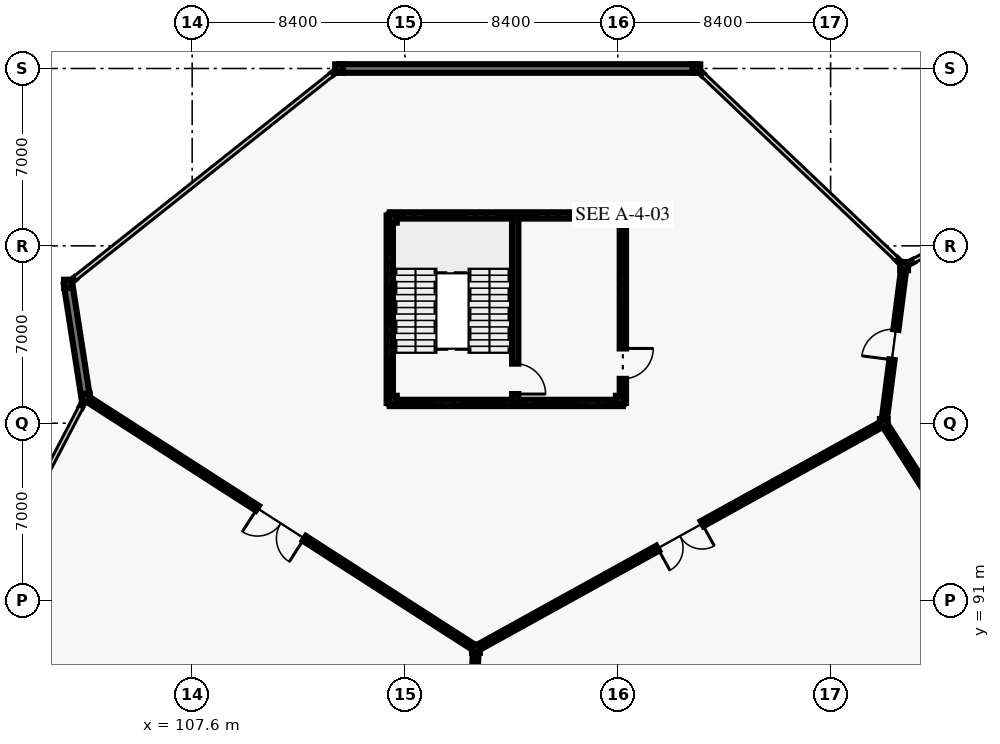
"""IFC4 building model, lengths in metres.
Left out: names, types, materials, properties, quantities, classifications, styles, units other than length and angle.
Written with IfcOpenShell. Run it as: python <this file> out.ifc"""

import sys

from ifc_helpers import new_model, si_unit, direction, frame, frame_2d, origin, origin_2d, place, context, subcontext, project, spatial, rectangle, i_section, extrude, element, fill, save


model = new_model("IFC4")
c1 = context("Model", 3, precision=1e-05, world=origin(), true_north=direction((0.0, 1.0)))
c2 = subcontext(c1, "Body", "Model", "MODEL_VIEW")
j1 = project(units=[si_unit("LENGTHUNIT", "METRE"), si_unit("PLANEANGLEUNIT", "RADIAN")], contexts=[c1])
p1 = place(None, origin())
s1 = spatial("IfcSite", under=j1, at=p1, CompositionType="ELEMENT")
p2 = place(p1, origin())
s2 = spatial("IfcBuilding", under=s1, at=p2, CompositionType="ELEMENT")
p3 = place(p2, frame((0.0, 0.0, 10.2)))
s3 = spatial("IfcBuildingStorey", under=s2, at=p3, CompositionType="ELEMENT", Elevation=10.2)
for number, where, z_axis, x_axis in (
    (1, (102.7, 103.5, 0.0), (0.0, 0.0, 1.0), (1.0, 0.0, 0.0)),
    (2, (103.4, 99.0, 0.0), (0.0, 0.0, 1.0), (1.0, 0.0, 0.0)),
    (3, (113.4, 112.0, 0.0), (0.0, 0.0, 1.0), (1.0, 0.0, 0.0)),
    (4, (118.8, 89.1, 0.0), (0.0, 0.0, 1.0), (1.0, 0.0, 0.0)),
    (5, (127.5, 112.0, 0.0), (0.0, 0.0, 1.0), (1.0, 0.0, 0.0)),
    (6, (134.9, 98.0, 0.0), (0.0, 0.0, 1.0), (1.0, 0.0, 0.0)),
    (7, (135.7, 104.2, 0.0), (0.0, 0.0, 1.0), (1.0, 0.0, 0.0)),
    (8, (115.52, 98.92, 0.0), (0.0, 0.0, 1.0), (1.0, 0.0, 0.0)),
    (9, (124.48, 98.92, 0.0), (0.0, 0.0, 1.0), (1.0, 0.0, 0.0)),
    (10, (124.48, 106.08, 0.0), (0.0, 0.0, 1.0), (1.0, 0.0, 0.0)),
    (11, (115.52, 106.08, 0.0), (0.0, 0.0, 1.0), (1.0, 0.0, 0.0)),
):
    element("IfcColumn", number, at=place(p3, frame(where, z_axis=z_axis, x_axis=x_axis)), inside=s3, PredefinedType="COLUMN", context=c2, shape_type="SweptSolid", body=[
        extrude(i_section(OverallWidth=0.311, OverallDepth=0.327, WebThickness=0.016, FlangeThickness=0.025, FilletRadius=0.017, at=origin_2d()), origin(), (0.0, 0.0, 1.0), 4.8),
    ])
p4 = place(p3, frame((103.21, 98.637, 0.0), z_axis=(0.0, 0.0, 1.0), x_axis=(0.464243799771, 0.885707454171, 0.0)))
e12 = element("IfcWall", 12, at=p4, inside=s3, PredefinedType="SOLIDWALL", context=c2, shape_type="SweptSolid", body=[
    extrude(rectangle(XDim=0.308, YDim=0.095, at=frame_2d((0.154, 0.0))), origin(), (0.0, 0.0, 1.0), 3.62),
])
for number, where, z_axis, x_axis in (
    (13, (127.53, 111.971, 0.0), (0.0, 0.0, 1.0), (0.726, -0.687, 0.0)),
    (14, (135.403, 104.482, 0.0), (0.0, 0.0, 1.0), (0.726, -0.687, 0.0)),
):
    element("IfcWall", number, at=place(p3, frame(where, z_axis=z_axis, x_axis=x_axis)), inside=s3, PredefinedType="SOLIDWALL", context=c2, shape_type="SweptSolid", body=[
        extrude(rectangle(XDim=0.308, YDim=0.095, at=frame_2d((0.154, 0.0))), origin(), (0.0, 0.0, 1.0), 3.62),
    ])
p5 = place(p3, frame((113.4, 112.0, 0.0), z_axis=(0.0, 0.0, 1.0), x_axis=(1.0, 0.0, 0.0)))
e15 = element("IfcWall", 15, at=p5, inside=s3, PredefinedType="SOLIDWALL", context=c2, shape_type="SweptSolid", body=[
    extrude(rectangle(XDim=14.1, YDim=0.34, at=frame_2d((7.05, 0.0))), origin(), (0.0, 0.0, 1.0), 3.62),
])
p6 = place(p3, frame((102.733, 103.526, 0.0), z_axis=(0.0, 0.0, 1.0), x_axis=(0.782180115256, 0.623052379257, 0.0)))
e16 = element("IfcWall", 16, at=p6, inside=s3, PredefinedType="SOLIDWALL", context=c2, shape_type="SweptSolid", body=[
    extrude(rectangle(XDim=0.308, YDim=0.095, at=frame_2d((0.154, 0.0))), origin(), (0.0, 0.0, 1.0), 3.62),
])
p7 = place(p3, frame((113.126, 111.782, 0.0), z_axis=(0.0, 0.0, 1.0), x_axis=(0.781872503851, 0.6234383592, 0.0)))
e17 = element("IfcWall", 17, at=p7, inside=s3, PredefinedType="SOLIDWALL", context=c2, shape_type="SweptSolid", body=[
    extrude(rectangle(XDim=0.308, YDim=0.095, at=frame_2d((0.154, 0.0))), origin(), (0.0, 0.0, 1.0), 3.62),
])
p8 = place(p3, frame((103.391, 99.059, 0.0), z_axis=(0.0, 0.0, 1.0), x_axis=(-0.153783616147, 0.988104548823, 0.0)))
e18 = element("IfcWall", 18, at=p8, inside=s3, PredefinedType="SOLIDWALL", context=c2, shape_type="SweptSolid", body=[
    extrude(rectangle(XDim=4.494, YDim=0.34, at=frame_2d((2.247, 0.0))), origin(), (0.0, 0.0, 1.0), 3.62),
])
p9 = place(p3, frame((135.79, 104.249, 0.0), z_axis=(0.0, 0.0, 1.0), x_axis=(0.876984894636, 0.480517944077, 0.0)))
e19 = element("IfcWall", 19, at=p9, inside=s3, PredefinedType="SOLIDWALL", context=c2, shape_type="SweptSolid", body=[
    extrude(rectangle(XDim=0.308, YDim=0.095, at=frame_2d((0.154, 0.0))), origin(), (0.0, 0.0, 1.0), 3.62),
])
p10 = place(p3, frame((117.9, 70.6, 0.0), z_axis=(0.0, 0.0, 1.0), x_axis=(0.048599072515, 0.998818366947, 0.0)))
e20 = element("IfcWall", 20, at=p10, inside=s3, PredefinedType="SOLIDWALL", context=c2, shape_type="SweptSolid", body=[
    extrude(rectangle(XDim=18.522, YDim=0.225, at=frame_2d((9.261, 0.0))), origin(), (0.0, 0.0, 1.0), 4.02),
])
p11 = place(p10, frame((8.336, 0.0, 0.0)))
e21 = element("IfcOpeningElement", 21, at=p11, cuts=e20, PredefinedType="OPENING", context=c2, shape_type="SweptSolid", body=[
    extrude(rectangle(XDim=1.85, YDim=2.4, at=frame_2d((0.925, 1.2))), frame((0.0, 0.123, 0.0), z_axis=(0.0, -1.0, 0.0), x_axis=(1.0, 0.0, 0.0)), (0.0, 0.0, 1.0), 0.245),
])
p12 = place(p3, frame((118.8, 89.1, 0.0), z_axis=(0.0, 0.0, 1.0), x_axis=(-0.841183241423, 0.540750177392, 0.0)))
e22 = element("IfcWall", 22, at=p12, inside=s3, PredefinedType="SOLIDWALL", context=c2, shape_type="SweptSolid", body=[
    extrude(rectangle(XDim=18.308, YDim=0.225, at=frame_2d((9.154, 0.0))), origin(), (0.0, 0.0, 1.0), 4.02),
])
p13 = place(p12, frame((8.054, 0.0, 0.0)))
e23 = element("IfcOpeningElement", 23, at=p13, cuts=e22, PredefinedType="OPENING", context=c2, shape_type="SweptSolid", body=[
    extrude(rectangle(XDim=2.2, YDim=2.6, at=frame_2d((1.1, 1.3))), frame((0.0, 0.123, 0.0), z_axis=(0.0, -1.0, 0.0), x_axis=(1.0, 0.0, 0.0)), (0.0, 0.0, 1.0), 0.245),
])
p14 = place(p3, frame((134.9, 98.0, 0.0), z_axis=(0.0, 0.0, 1.0), x_axis=(-0.875181353329, -0.483794996652, 0.0)))
e24 = element("IfcWall", 24, at=p14, inside=s3, PredefinedType="SOLIDWALL", context=c2, shape_type="SweptSolid", body=[
    extrude(rectangle(XDim=18.396, YDim=0.225, at=frame_2d((9.198, 0.0))), origin(), (0.0, 0.0, 1.0), 4.02),
])
p15 = place(p14, frame((8.198, 0.0, 0.0)))
e25 = element("IfcOpeningElement", 25, at=p15, cuts=e24, PredefinedType="OPENING", context=c2, shape_type="SweptSolid", body=[
    extrude(rectangle(XDim=2.0, YDim=2.5, at=frame_2d((1.0, 1.25))), frame((0.0, 0.123, 0.0), z_axis=(0.0, -1.0, 0.0), x_axis=(1.0, 0.0, 0.0)), (0.0, 0.0, 1.0), 0.245),
])
p16 = place(p3, frame((143.1, 85.2, 0.0), z_axis=(0.0, 0.0, 1.0), x_axis=(-0.539434641352, 0.842027474439, 0.0)))
e26 = element("IfcWall", 26, at=p16, inside=s3, PredefinedType="SOLIDWALL", context=c2, shape_type="SweptSolid", body=[
    extrude(rectangle(XDim=15.201, YDim=0.225, at=frame_2d((7.601, 0.0))), origin(), (0.0, 0.0, 1.0), 4.02),
])
p17 = place(p16, frame((6.676, 0.0, 0.0)))
e27 = element("IfcOpeningElement", 27, at=p17, cuts=e26, PredefinedType="OPENING", context=c2, shape_type="SweptSolid", body=[
    extrude(rectangle(XDim=1.85, YDim=2.4, at=frame_2d((0.925, 1.2))), frame((0.0, 0.123, 0.0), z_axis=(0.0, -1.0, 0.0), x_axis=(1.0, 0.0, 0.0)), (0.0, 0.0, 1.0), 0.245),
])
p18 = place(p3, frame((134.9, 98.0, 0.0), z_axis=(0.0, 0.0, 1.0), x_axis=(0.127980011854, 0.991776747341, 0.0)))
e28 = element("IfcWall", 28, at=p18, inside=s3, PredefinedType="SOLIDWALL", context=c2, shape_type="SweptSolid", body=[
    extrude(rectangle(XDim=6.251, YDim=0.205, at=frame_2d((3.126, 0.0))), origin(), (0.0, 0.0, 1.0), 3.32),
])
p19 = place(p18, frame((2.526, 0.0, 0.0)))
e29 = element("IfcOpeningElement", 29, at=p19, cuts=e28, PredefinedType="OPENING", context=c2, shape_type="SweptSolid", body=[
    extrude(rectangle(XDim=1.2, YDim=2.2, at=frame_2d((0.6, 1.1))), frame((0.0, 0.113, 0.0), z_axis=(0.0, -1.0, 0.0), x_axis=(1.0, 0.0, 0.0)), (0.0, 0.0, 1.0), 0.225),
])
p20 = place(p3, frame((115.4, 98.8, 0.0), z_axis=(0.0, 0.0, 1.0), x_axis=(0.0, 1.0, 0.0)))
e30 = element("IfcWall", 30, at=p20, inside=s3, PredefinedType="SHEAR", context=c2, shape_type="SweptSolid", body=[
    extrude(rectangle(XDim=7.4, YDim=0.25, at=frame_2d((3.7, 0.0))), origin(), (0.0, 0.0, 1.0), 4.56),
])
for number, where, z_axis, x_axis in (
    (31, (115.4, 106.2, 0.0), (0.0, 0.0, 1.0), (1.0, 0.0, 0.0)),
    (32, (124.6, 98.8, 0.0), (0.0, 0.0, 1.0), (-1.0, 0.0, 0.0)),
):
    element("IfcWall", number, at=place(p3, frame(where, z_axis=z_axis, x_axis=x_axis)), inside=s3, PredefinedType="SHEAR", context=c2, shape_type="SweptSolid", body=[
        extrude(rectangle(XDim=9.2, YDim=0.25, at=frame_2d((4.6, 0.0))), origin(), (0.0, 0.0, 1.0), 4.56),
    ])
p21 = place(p3, frame((124.6, 106.2, 0.0), z_axis=(0.0, 0.0, 1.0), x_axis=(0.0, -1.0, 0.0)))
e33 = element("IfcWall", 33, at=p21, inside=s3, PredefinedType="SHEAR", context=c2, shape_type="SweptSolid", body=[
    extrude(rectangle(XDim=7.4, YDim=0.25, at=frame_2d((3.7, 0.0))), origin(), (0.0, 0.0, 1.0), 4.56),
])
p22 = place(p21, frame((5.25, 0.0, 0.0)))
e34 = element("IfcOpeningElement", 34, at=p22, cuts=e33, PredefinedType="OPENING", context=c2, shape_type="SweptSolid", body=[
    extrude(rectangle(XDim=1.2, YDim=2.2, at=frame_2d((0.6, 1.1))), frame((0.0, 0.135, 0.0), z_axis=(0.0, -1.0, 0.0), x_axis=(1.0, 0.0, 0.0)), (0.0, 0.0, 1.0), 0.27),
])
p23 = place(p3, frame((120.35, 106.2, 0.0), z_axis=(0.0, 0.0, 1.0), x_axis=(0.0, -1.0, 0.0)))
e35 = element("IfcWall", 35, at=p23, inside=s3, PredefinedType="SHEAR", context=c2, shape_type="SweptSolid", body=[
    extrude(rectangle(XDim=7.4, YDim=0.25, at=frame_2d((3.7, 0.0))), origin(), (0.0, 0.0, 1.0), 4.56),
])
p24 = place(p23, frame((5.85, 0.0, 0.0)))
e36 = element("IfcOpeningElement", 36, at=p24, cuts=e35, PredefinedType="OPENING", context=c2, shape_type="SweptSolid", body=[
    extrude(rectangle(XDim=1.2, YDim=2.2, at=frame_2d((0.6, 1.1))), frame((0.0, 0.135, 0.0), z_axis=(0.0, -1.0, 0.0), x_axis=(1.0, 0.0, 0.0)), (0.0, 0.0, 1.0), 0.27),
])
p25 = place(p13, origin())
e37 = element("IfcDoor", 37, at=p25, inside=s3, OperationType="DOUBLE_DOOR_SINGLE_SWING", PredefinedType="DOOR", context=c2, shape_type="SweptSolid", body=[
    extrude(rectangle(XDim=2.2, YDim=2.6, at=frame_2d((1.1, 1.3))), frame((0.0, 0.025, 0.0), z_axis=(0.0, -1.0, 0.0), x_axis=(1.0, 0.0, 0.0)), (0.0, 0.0, 1.0), 0.05),
])
fill(e23, e37)
p26 = place(p15, origin())
e38 = element("IfcDoor", 38, at=p26, inside=s3, OperationType="DOUBLE_DOOR_SINGLE_SWING", PredefinedType="DOOR", context=c2, shape_type="SweptSolid", body=[
    extrude(rectangle(XDim=2.0, YDim=2.5, at=frame_2d((1.0, 1.25))), frame((0.0, 0.025, 0.0), z_axis=(0.0, -1.0, 0.0), x_axis=(1.0, 0.0, 0.0)), (0.0, 0.0, 1.0), 0.05),
])
fill(e25, e38)
p27 = place(p19, origin())
e39 = element("IfcDoor", 39, at=p27, inside=s3, OperationType="SINGLE_SWING_LEFT", PredefinedType="DOOR", context=c2, shape_type="SweptSolid", body=[
    extrude(rectangle(XDim=1.2, YDim=2.2, at=frame_2d((0.6, 1.1))), frame((0.0, 0.025, 0.0), z_axis=(0.0, -1.0, 0.0), x_axis=(1.0, 0.0, 0.0)), (0.0, 0.0, 1.0), 0.05),
])
fill(e29, e39)
p28 = place(p22, origin())
e40 = element("IfcDoor", 40, at=p28, inside=s3, OperationType="SINGLE_SWING_LEFT", PredefinedType="DOOR", context=c2, shape_type="SweptSolid", body=[
    extrude(rectangle(XDim=1.2, YDim=2.2, at=frame_2d((0.6, 1.1))), frame((0.0, 0.025, 0.0), z_axis=(0.0, -1.0, 0.0), x_axis=(1.0, 0.0, 0.0)), (0.0, 0.0, 1.0), 0.05),
])
fill(e34, e40)
p29 = place(p24, origin())
e41 = element("IfcDoor", 41, at=p29, inside=s3, OperationType="SINGLE_SWING_RIGHT", PredefinedType="DOOR", context=c2, shape_type="SweptSolid", body=[
    extrude(rectangle(XDim=1.2, YDim=2.2, at=frame_2d((0.6, 1.1))), frame((0.0, 0.025, 0.0), z_axis=(0.0, -1.0, 0.0), x_axis=(1.0, 0.0, 0.0)), (0.0, 0.0, 1.0), 0.05),
])
fill(e36, e41)
save(model, sys.argv[1])
